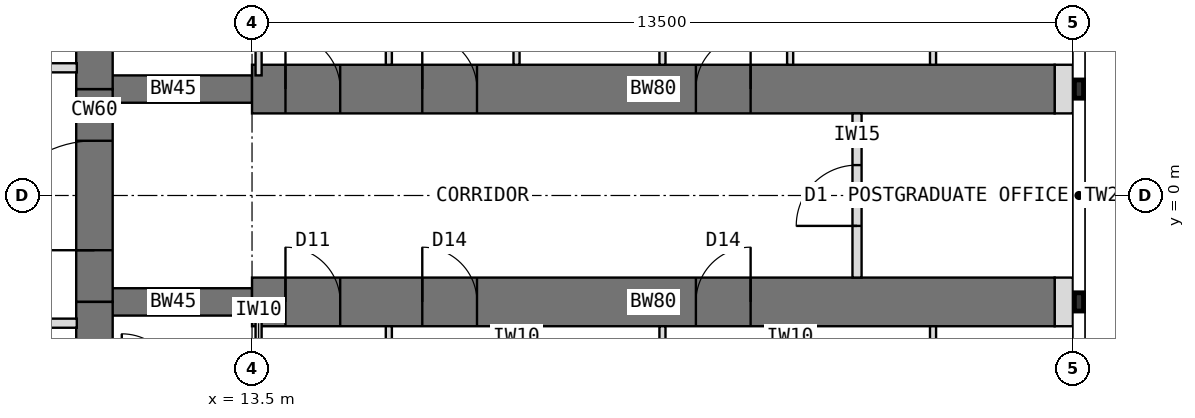
"""IFC4 building model, lengths in metres.
Left out: names, types, materials, properties, quantities, classifications, styles, units other than length and angle.
Written with IfcOpenShell. Run it as: python <this file> out.ifc"""

import sys

from ifc_helpers import new_model, si_unit, direction, frame, frame_2d, origin, place, context, subcontext, project, spatial, rectangle, extrude, element, fill, save


model = new_model("IFC4")
c1 = context("Model", 3, precision=1e-05, world=origin(), true_north=direction((0.0, 1.0)))
c2 = subcontext(c1, "Body", "Model", "MODEL_VIEW")
j1 = project(units=[si_unit("LENGTHUNIT", "METRE"), si_unit("PLANEANGLEUNIT", "RADIAN")], contexts=[c1])
p1 = place(None, origin())
s1 = spatial("IfcSite", under=j1, at=p1, CompositionType="ELEMENT")
p2 = place(p1, origin())
s2 = spatial("IfcBuilding", under=s1, at=p2, CompositionType="ELEMENT")
p3 = place(p2, frame((0.0, 0.0, 157.5)))
s3 = spatial("IfcBuildingStorey", under=s2, at=p3, CompositionType="ELEMENT", Elevation=157.5)
p4 = place(p3, frame((10.908, -6.298, 0.0), z_axis=(0.0, 0.0, 1.0), x_axis=(0.0, 1.0, 0.0)))
e1 = element("IfcWall", 1, at=p4, inside=s3, PredefinedType="SHEAR", context=c2, shape_type="SweptSolid", body=[
    extrude(rectangle(XDim=4.548, YDim=0.6, at=frame_2d((2.274, 0.0))), origin(), (0.0, 0.0, 1.0), 4.0),
])
p5 = place(p3, frame((10.908, -1.75, 0.0), z_axis=(0.0, 0.0, 1.0), x_axis=(0.0, 1.0, 0.0)))
e2 = element("IfcWall", 2, at=p5, inside=s3, PredefinedType="SHEAR", context=c2, shape_type="SweptSolid", body=[
    extrude(rectangle(XDim=3.5, YDim=0.6, at=frame_2d((1.75, 0.0))), origin(), (0.0, 0.0, 1.0), 4.0),
])
p6 = place(p5, frame((0.85, 0.0, 0.0)))
e3 = element("IfcOpeningElement", 3, at=p6, cuts=e2, PredefinedType="OPENING", context=c2, shape_type="SweptSolid", body=[
    extrude(rectangle(XDim=1.8, YDim=2.1, at=frame_2d((0.9, 1.05))), frame((0.0, 0.31, 0.0), z_axis=(0.0, -1.0, 0.0), x_axis=(1.0, 0.0, 0.0)), (0.0, 0.0, 1.0), 0.62),
])
p7 = place(p3, frame((10.908, 1.75, 0.0), z_axis=(0.0, 0.0, 1.0), x_axis=(0.0, 1.0, 0.0)))
e4 = element("IfcWall", 4, at=p7, inside=s3, PredefinedType="SHEAR", context=c2, shape_type="SweptSolid", body=[
    extrude(rectangle(XDim=4.548, YDim=0.6, at=frame_2d((2.274, 0.0))), origin(), (0.0, 0.0, 1.0), 4.0),
])
p8 = place(p3, frame((10.908, 1.75, 0.0), z_axis=(0.0, 0.0, 1.0), x_axis=(1.0, 0.0, 0.0)))
e5 = element("IfcWall", 5, at=p8, inside=s3, PredefinedType="SHEAR", context=c2, shape_type="SweptSolid", body=[
    extrude(rectangle(XDim=2.592, YDim=0.45, at=frame_2d((1.296, 0.0))), origin(), (0.0, 0.0, 1.0), 4.0),
])
p9 = place(p3, frame((13.5, 1.75, 0.0), z_axis=(0.0, 0.0, 1.0), x_axis=(1.0, 0.0, 0.0)))
e6 = element("IfcWall", 6, at=p9, inside=s3, PredefinedType="SHEAR", context=c2, shape_type="SweptSolid", body=[
    extrude(rectangle(XDim=13.2, YDim=0.8, at=frame_2d((6.6, 0.0))), origin(), (0.0, 0.0, 1.0), 4.0),
])
p10 = place(p9, frame((0.55, 0.0, 0.0)))
e7 = element("IfcOpeningElement", 7, at=p10, cuts=e6, PredefinedType="OPENING", context=c2, shape_type="SweptSolid", body=[
    extrude(rectangle(XDim=0.9, YDim=2.1, at=frame_2d((0.45, 1.05))), frame((0.0, 0.41, 0.0), z_axis=(0.0, -1.0, 0.0), x_axis=(1.0, 0.0, 0.0)), (0.0, 0.0, 1.0), 0.82),
])
p11 = place(p9, frame((2.8, 0.0, 0.0)))
e8 = element("IfcOpeningElement", 8, at=p11, cuts=e6, PredefinedType="OPENING", context=c2, shape_type="SweptSolid", body=[
    extrude(rectangle(XDim=0.9, YDim=2.1, at=frame_2d((0.45, 1.05))), frame((0.0, 0.41, 0.0), z_axis=(0.0, -1.0, 0.0), x_axis=(1.0, 0.0, 0.0)), (0.0, 0.0, 1.0), 0.82),
])
p12 = place(p9, frame((7.3, 0.0, 0.0)))
e9 = element("IfcOpeningElement", 9, at=p12, cuts=e6, PredefinedType="OPENING", context=c2, shape_type="SweptSolid", body=[
    extrude(rectangle(XDim=0.9, YDim=2.1, at=frame_2d((0.45, 1.05))), frame((0.0, 0.41, 0.0), z_axis=(0.0, -1.0, 0.0), x_axis=(1.0, 0.0, 0.0)), (0.0, 0.0, 1.0), 0.82),
])
p13 = place(p3, frame((10.908, -1.75, 0.0), z_axis=(0.0, 0.0, 1.0), x_axis=(1.0, 0.0, 0.0)))
e10 = element("IfcWall", 10, at=p13, inside=s3, PredefinedType="SHEAR", context=c2, shape_type="SweptSolid", body=[
    extrude(rectangle(XDim=2.592, YDim=0.45, at=frame_2d((1.296, 0.0))), origin(), (0.0, 0.0, 1.0), 4.0),
])
p14 = place(p3, frame((13.5, -1.75, 0.0), z_axis=(0.0, 0.0, 1.0), x_axis=(1.0, 0.0, 0.0)))
e11 = element("IfcWall", 11, at=p14, inside=s3, PredefinedType="SHEAR", context=c2, shape_type="SweptSolid", body=[
    extrude(rectangle(XDim=13.2, YDim=0.8, at=frame_2d((6.6, 0.0))), origin(), (0.0, 0.0, 1.0), 4.0),
])
p15 = place(p14, frame((0.55, 0.0, 0.0)))
e12 = element("IfcOpeningElement", 12, at=p15, cuts=e11, PredefinedType="OPENING", context=c2, shape_type="SweptSolid", body=[
    extrude(rectangle(XDim=0.9, YDim=2.1, at=frame_2d((0.45, 1.05))), frame((0.0, 0.41, 0.0), z_axis=(0.0, -1.0, 0.0), x_axis=(1.0, 0.0, 0.0)), (0.0, 0.0, 1.0), 0.82),
])
p16 = place(p14, frame((2.8, 0.0, 0.0)))
e13 = element("IfcOpeningElement", 13, at=p16, cuts=e11, PredefinedType="OPENING", context=c2, shape_type="SweptSolid", body=[
    extrude(rectangle(XDim=0.9, YDim=2.1, at=frame_2d((0.45, 1.05))), frame((0.0, 0.41, 0.0), z_axis=(0.0, -1.0, 0.0), x_axis=(1.0, 0.0, 0.0)), (0.0, 0.0, 1.0), 0.82),
])
p17 = place(p14, frame((7.3, 0.0, 0.0)))
e14 = element("IfcOpeningElement", 14, at=p17, cuts=e11, PredefinedType="OPENING", context=c2, shape_type="SweptSolid", body=[
    extrude(rectangle(XDim=0.9, YDim=2.1, at=frame_2d((0.45, 1.05))), frame((0.0, 0.41, 0.0), z_axis=(0.0, -1.0, 0.0), x_axis=(1.0, 0.0, 0.0)), (0.0, 0.0, 1.0), 0.82),
])
for number, where, z_axis, x_axis in (
    (15, (26.7, 1.75, 0.0), (0.0, 0.0, 1.0), (1.0, 0.0, 0.0)),
    (16, (26.7, -1.75, 0.0), (0.0, 0.0, 1.0), (1.0, 0.0, 0.0)),
):
    element("IfcWall", number, at=place(p3, frame(where, z_axis=z_axis, x_axis=x_axis)), inside=s3, PredefinedType="PARTITIONING", context=c2, shape_type="SweptSolid", body=[
        extrude(rectangle(XDim=0.3, YDim=0.8, at=frame_2d((0.15, 0.0))), origin(), (0.0, 0.0, 1.0), 3.8),
    ])
for number, where, z_axis, x_axis in (
    (17, (15.75, 2.15, 0.0), (0.0, 0.0, 1.0), (0.0, 1.0, 0.0)),
    (18, (20.25, 2.15, 0.0), (0.0, 0.0, 1.0), (0.0, 1.0, 0.0)),
):
    element("IfcWall", number, at=place(p3, frame(where, z_axis=z_axis, x_axis=x_axis)), inside=s3, PredefinedType="PARTITIONING", context=c2, shape_type="SweptSolid", body=[
        extrude(rectangle(XDim=4.6, YDim=0.1, at=frame_2d((2.3, 0.0))), origin(), (0.0, 0.0, 1.0), 3.8),
    ])
p18 = place(p3, frame((17.85, 2.15, 0.0), z_axis=(0.0, 0.0, 1.0), x_axis=(0.0, 1.0, 0.0)))
e19 = element("IfcWall", 19, at=p18, inside=s3, PredefinedType="PARTITIONING", context=c2, shape_type="SweptSolid", body=[
    extrude(rectangle(XDim=3.4, YDim=0.1, at=frame_2d((1.7, 0.0))), origin(), (0.0, 0.0, 1.0), 3.8),
])
p19 = place(p18, frame((1.25, 0.0, 0.0)))
e20 = element("IfcOpeningElement", 20, at=p19, cuts=e19, PredefinedType="OPENING", context=c2, shape_type="SweptSolid", body=[
    extrude(rectangle(XDim=0.9, YDim=2.1, at=frame_2d((0.45, 1.05))), frame((0.0, 0.06, 0.0), z_axis=(0.0, -1.0, 0.0), x_axis=(1.0, 0.0, 0.0)), (0.0, 0.0, 1.0), 0.12),
])
p20 = place(p3, frame((22.35, 2.15, 0.0), z_axis=(0.0, 0.0, 1.0), x_axis=(0.0, 1.0, 0.0)))
e21 = element("IfcWall", 21, at=p20, inside=s3, PredefinedType="PARTITIONING", context=c2, shape_type="SweptSolid", body=[
    extrude(rectangle(XDim=3.4, YDim=0.1, at=frame_2d((1.7, 0.0))), origin(), (0.0, 0.0, 1.0), 3.8),
])
p21 = place(p20, frame((1.25, 0.0, 0.0)))
e22 = element("IfcOpeningElement", 22, at=p21, cuts=e21, PredefinedType="OPENING", context=c2, shape_type="SweptSolid", body=[
    extrude(rectangle(XDim=0.9, YDim=2.1, at=frame_2d((0.45, 1.05))), frame((0.0, 0.06, 0.0), z_axis=(0.0, -1.0, 0.0), x_axis=(1.0, 0.0, 0.0)), (0.0, 0.0, 1.0), 0.12),
])
p22 = place(p3, frame((24.7, 2.15, 0.0), z_axis=(0.0, 0.0, 1.0), x_axis=(0.0, 1.0, 0.0)))
e23 = element("IfcWall", 23, at=p22, inside=s3, PredefinedType="PARTITIONING", context=c2, shape_type="SweptSolid", body=[
    extrude(rectangle(XDim=3.4, YDim=0.1, at=frame_2d((1.7, 0.0))), origin(), (0.0, 0.0, 1.0), 3.8),
])
p23 = place(p3, frame((13.608, 1.975, 0.0), z_axis=(0.0, 0.0, 1.0), x_axis=(0.0, 1.0, 0.0)))
e24 = element("IfcWall", 24, at=p23, inside=s3, PredefinedType="PARTITIONING", context=c2, shape_type="SweptSolid", body=[
    extrude(rectangle(XDim=3.2, YDim=0.1, at=frame_2d((1.6, 0.0))), origin(), (0.0, 0.0, 1.0), 3.8),
])
for number, where, z_axis, x_axis in (
    (25, (15.75, -2.15, 0.0), (0.0, 0.0, 1.0), (0.0, -1.0, 0.0)),
    (26, (20.25, -2.15, 0.0), (0.0, 0.0, 1.0), (0.0, -1.0, 0.0)),
):
    element("IfcWall", number, at=place(p3, frame(where, z_axis=z_axis, x_axis=x_axis)), inside=s3, PredefinedType="PARTITIONING", context=c2, shape_type="SweptSolid", body=[
        extrude(rectangle(XDim=4.6, YDim=0.1, at=frame_2d((2.3, 0.0))), origin(), (0.0, 0.0, 1.0), 3.8),
    ])
p24 = place(p3, frame((17.85, -2.15, 0.0), z_axis=(0.0, 0.0, 1.0), x_axis=(0.0, -1.0, 0.0)))
e27 = element("IfcWall", 27, at=p24, inside=s3, PredefinedType="PARTITIONING", context=c2, shape_type="SweptSolid", body=[
    extrude(rectangle(XDim=3.4, YDim=0.1, at=frame_2d((1.7, 0.0))), origin(), (0.0, 0.0, 1.0), 3.8),
])
p25 = place(p24, frame((1.25, 0.0, 0.0)))
e28 = element("IfcOpeningElement", 28, at=p25, cuts=e27, PredefinedType="OPENING", context=c2, shape_type="SweptSolid", body=[
    extrude(rectangle(XDim=0.9, YDim=2.1, at=frame_2d((0.45, 1.05))), frame((0.0, 0.06, 0.0), z_axis=(0.0, -1.0, 0.0), x_axis=(1.0, 0.0, 0.0)), (0.0, 0.0, 1.0), 0.12),
])
p26 = place(p3, frame((22.35, -2.15, 0.0), z_axis=(0.0, 0.0, 1.0), x_axis=(0.0, -1.0, 0.0)))
e29 = element("IfcWall", 29, at=p26, inside=s3, PredefinedType="PARTITIONING", context=c2, shape_type="SweptSolid", body=[
    extrude(rectangle(XDim=3.4, YDim=0.1, at=frame_2d((1.7, 0.0))), origin(), (0.0, 0.0, 1.0), 3.8),
])
p27 = place(p26, frame((1.25, 0.0, 0.0)))
e30 = element("IfcOpeningElement", 30, at=p27, cuts=e29, PredefinedType="OPENING", context=c2, shape_type="SweptSolid", body=[
    extrude(rectangle(XDim=0.9, YDim=2.1, at=frame_2d((0.45, 1.05))), frame((0.0, 0.06, 0.0), z_axis=(0.0, -1.0, 0.0), x_axis=(1.0, 0.0, 0.0)), (0.0, 0.0, 1.0), 0.12),
])
p28 = place(p3, frame((24.7, -2.15, 0.0), z_axis=(0.0, 0.0, 1.0), x_axis=(0.0, -1.0, 0.0)))
e31 = element("IfcWall", 31, at=p28, inside=s3, PredefinedType="PARTITIONING", context=c2, shape_type="SweptSolid", body=[
    extrude(rectangle(XDim=3.4, YDim=0.1, at=frame_2d((1.7, 0.0))), origin(), (0.0, 0.0, 1.0), 3.8),
])
p29 = place(p3, frame((13.608, -1.975, 0.0), z_axis=(0.0, 0.0, 1.0), x_axis=(0.0, -1.0, 0.0)))
e32 = element("IfcWall", 32, at=p29, inside=s3, PredefinedType="PARTITIONING", context=c2, shape_type="SweptSolid", body=[
    extrude(rectangle(XDim=1.2, YDim=0.1, at=frame_2d((0.6, 0.0))), origin(), (0.0, 0.0, 1.0), 3.8),
])
p30 = place(p3, frame((6.143, 2.1, 0.0), z_axis=(0.0, 0.0, 1.0), x_axis=(1.0, 0.0, 0.0)))
e33 = element("IfcWall", 33, at=p30, inside=s3, PredefinedType="PARTITIONING", context=c2, shape_type="SweptSolid", body=[
    extrude(rectangle(XDim=4.476, YDim=0.15, at=frame_2d((2.238, 0.0))), origin(), (0.0, 0.0, 1.0), 3.8),
])
p31 = place(p30, frame((2.633, 0.0, 0.0)))
e34 = element("IfcOpeningElement", 34, at=p31, cuts=e33, PredefinedType="OPENING", context=c2, shape_type="SweptSolid", body=[
    extrude(rectangle(XDim=1.0, YDim=2.1, at=frame_2d((0.5, 1.05))), frame((0.0, 0.085, 0.0), z_axis=(0.0, -1.0, 0.0), x_axis=(1.0, 0.0, 0.0)), (0.0, 0.0, 1.0), 0.17),
])
p32 = place(p3, frame((10.618, -2.1, 0.0), z_axis=(0.0, 0.0, 1.0), x_axis=(-1.0, 0.0, 0.0)))
e35 = element("IfcWall", 35, at=p32, inside=s3, PredefinedType="PARTITIONING", context=c2, shape_type="SweptSolid", body=[
    extrude(rectangle(XDim=4.476, YDim=0.15, at=frame_2d((2.238, 0.0))), origin(), (0.0, 0.0, 1.0), 3.8),
])
p33 = place(p32, frame((0.843, 0.0, 0.0)))
e36 = element("IfcOpeningElement", 36, at=p33, cuts=e35, PredefinedType="OPENING", context=c2, shape_type="SweptSolid", body=[
    extrude(rectangle(XDim=1.0, YDim=2.1, at=frame_2d((0.5, 1.05))), frame((0.0, 0.085, 0.0), z_axis=(0.0, -1.0, 0.0), x_axis=(1.0, 0.0, 0.0)), (0.0, 0.0, 1.0), 0.17),
])
p34 = place(p3, frame((23.45, -1.35, 0.0), z_axis=(0.0, 0.0, 1.0), x_axis=(0.0, 1.0, 0.0)))
e37 = element("IfcWall", 37, at=p34, inside=s3, PredefinedType="PARTITIONING", context=c2, shape_type="SweptSolid", body=[
    extrude(rectangle(XDim=2.7, YDim=0.15, at=frame_2d((1.35, 0.0))), origin(), (0.0, 0.0, 1.0), 3.8),
])
p35 = place(p34, frame((0.85, 0.0, 0.0)))
e38 = element("IfcOpeningElement", 38, at=p35, cuts=e37, PredefinedType="OPENING", context=c2, shape_type="SweptSolid", body=[
    extrude(rectangle(XDim=1.0, YDim=2.1, at=frame_2d((0.5, 1.05))), frame((0.0, 0.085, 0.0), z_axis=(0.0, -1.0, 0.0), x_axis=(1.0, 0.0, 0.0)), (0.0, 0.0, 1.0), 0.17),
])
p36 = place(p6, origin())
e39 = element("IfcDoor", 39, at=p36, inside=s3, OperationType="DOUBLE_DOOR_DOUBLE_SWING", PredefinedType="DOOR", context=c2, shape_type="SweptSolid", body=[
    extrude(rectangle(XDim=1.72, YDim=2.06, at=frame_2d((0.9, 1.03))), frame((0.0, 0.025, 0.0), z_axis=(0.0, -1.0, 0.0), x_axis=(1.0, 0.0, 0.0)), (0.0, 0.0, 1.0), 0.05),
    extrude(rectangle(XDim=0.04, YDim=2.1, at=frame_2d((0.02, 1.05))), frame((0.0, 0.3, 0.0), z_axis=(0.0, -1.0, 0.0), x_axis=(1.0, 0.0, 0.0)), (0.0, 0.0, 1.0), 0.6),
    extrude(rectangle(XDim=0.04, YDim=2.1, at=frame_2d((1.78, 1.05))), frame((0.0, 0.3, 0.0), z_axis=(0.0, -1.0, 0.0), x_axis=(1.0, 0.0, 0.0)), (0.0, 0.0, 1.0), 0.6),
    extrude(rectangle(XDim=1.72, YDim=0.04, at=frame_2d((0.9, 2.08))), frame((0.0, 0.3, 0.0), z_axis=(0.0, -1.0, 0.0), x_axis=(1.0, 0.0, 0.0)), (0.0, 0.0, 1.0), 0.6),
])
fill(e3, e39)
p37 = place(p35, origin())
e40 = element("IfcDoor", 40, at=p37, inside=s3, OperationType="SINGLE_SWING_LEFT", PredefinedType="DOOR", context=c2, shape_type="SweptSolid", body=[
    extrude(rectangle(XDim=1.0, YDim=2.1, at=frame_2d((0.5, 1.05))), frame((0.0, 0.025, 0.0), z_axis=(0.0, -1.0, 0.0), x_axis=(1.0, 0.0, 0.0)), (0.0, 0.0, 1.0), 0.05),
])
fill(e38, e40)
p38 = place(p10, origin())
e41 = element("IfcDoor", 41, at=p38, inside=s3, OperationType="SINGLE_SWING_LEFT", PredefinedType="DOOR", context=c2, shape_type="SweptSolid", body=[
    extrude(rectangle(XDim=0.82, YDim=2.06, at=frame_2d((0.45, 1.03))), frame((0.0, 0.025, 0.0), z_axis=(0.0, -1.0, 0.0), x_axis=(1.0, 0.0, 0.0)), (0.0, 0.0, 1.0), 0.05),
    extrude(rectangle(XDim=0.04, YDim=2.1, at=frame_2d((0.02, 1.05))), frame((0.0, 0.4, 0.0), z_axis=(0.0, -1.0, 0.0), x_axis=(1.0, 0.0, 0.0)), (0.0, 0.0, 1.0), 0.8),
    extrude(rectangle(XDim=0.04, YDim=2.1, at=frame_2d((0.88, 1.05))), frame((0.0, 0.4, 0.0), z_axis=(0.0, -1.0, 0.0), x_axis=(1.0, 0.0, 0.0)), (0.0, 0.0, 1.0), 0.8),
    extrude(rectangle(XDim=0.82, YDim=0.04, at=frame_2d((0.45, 2.08))), frame((0.0, 0.4, 0.0), z_axis=(0.0, -1.0, 0.0), x_axis=(1.0, 0.0, 0.0)), (0.0, 0.0, 1.0), 0.8),
])
fill(e7, e41)
p39 = place(p11, origin())
e42 = element("IfcDoor", 42, at=p39, inside=s3, OperationType="SINGLE_SWING_LEFT", PredefinedType="DOOR", context=c2, shape_type="SweptSolid", body=[
    extrude(rectangle(XDim=0.82, YDim=2.06, at=frame_2d((0.45, 1.03))), frame((0.0, 0.025, 0.0), z_axis=(0.0, -1.0, 0.0), x_axis=(1.0, 0.0, 0.0)), (0.0, 0.0, 1.0), 0.05),
    extrude(rectangle(XDim=0.04, YDim=2.1, at=frame_2d((0.02, 1.05))), frame((0.0, 0.4, 0.0), z_axis=(0.0, -1.0, 0.0), x_axis=(1.0, 0.0, 0.0)), (0.0, 0.0, 1.0), 0.8),
    extrude(rectangle(XDim=0.04, YDim=2.1, at=frame_2d((0.88, 1.05))), frame((0.0, 0.4, 0.0), z_axis=(0.0, -1.0, 0.0), x_axis=(1.0, 0.0, 0.0)), (0.0, 0.0, 1.0), 0.8),
    extrude(rectangle(XDim=0.82, YDim=0.04, at=frame_2d((0.45, 2.08))), frame((0.0, 0.4, 0.0), z_axis=(0.0, -1.0, 0.0), x_axis=(1.0, 0.0, 0.0)), (0.0, 0.0, 1.0), 0.8),
])
fill(e8, e42)
p40 = place(p12, origin())
e43 = element("IfcDoor", 43, at=p40, inside=s3, OperationType="SINGLE_SWING_RIGHT", PredefinedType="DOOR", context=c2, shape_type="SweptSolid", body=[
    extrude(rectangle(XDim=0.82, YDim=2.06, at=frame_2d((0.45, 1.03))), frame((0.0, 0.025, 0.0), z_axis=(0.0, -1.0, 0.0), x_axis=(1.0, 0.0, 0.0)), (0.0, 0.0, 1.0), 0.05),
    extrude(rectangle(XDim=0.04, YDim=2.1, at=frame_2d((0.02, 1.05))), frame((0.0, 0.4, 0.0), z_axis=(0.0, -1.0, 0.0), x_axis=(1.0, 0.0, 0.0)), (0.0, 0.0, 1.0), 0.8),
    extrude(rectangle(XDim=0.04, YDim=2.1, at=frame_2d((0.88, 1.05))), frame((0.0, 0.4, 0.0), z_axis=(0.0, -1.0, 0.0), x_axis=(1.0, 0.0, 0.0)), (0.0, 0.0, 1.0), 0.8),
    extrude(rectangle(XDim=0.82, YDim=0.04, at=frame_2d((0.45, 2.08))), frame((0.0, 0.4, 0.0), z_axis=(0.0, -1.0, 0.0), x_axis=(1.0, 0.0, 0.0)), (0.0, 0.0, 1.0), 0.8),
])
fill(e9, e43)
p41 = place(p15, origin())
e44 = element("IfcDoor", 44, at=p41, inside=s3, OperationType="SINGLE_SWING_LEFT", PredefinedType="DOOR", context=c2, shape_type="SweptSolid", body=[
    extrude(rectangle(XDim=0.82, YDim=2.06, at=frame_2d((0.45, 1.03))), frame((0.0, 0.025, 0.0), z_axis=(0.0, -1.0, 0.0), x_axis=(1.0, 0.0, 0.0)), (0.0, 0.0, 1.0), 0.05),
    extrude(rectangle(XDim=0.04, YDim=2.1, at=frame_2d((0.02, 1.05))), frame((0.0, 0.4, 0.0), z_axis=(0.0, -1.0, 0.0), x_axis=(1.0, 0.0, 0.0)), (0.0, 0.0, 1.0), 0.8),
    extrude(rectangle(XDim=0.04, YDim=2.1, at=frame_2d((0.88, 1.05))), frame((0.0, 0.4, 0.0), z_axis=(0.0, -1.0, 0.0), x_axis=(1.0, 0.0, 0.0)), (0.0, 0.0, 1.0), 0.8),
    extrude(rectangle(XDim=0.82, YDim=0.04, at=frame_2d((0.45, 2.08))), frame((0.0, 0.4, 0.0), z_axis=(0.0, -1.0, 0.0), x_axis=(1.0, 0.0, 0.0)), (0.0, 0.0, 1.0), 0.8),
])
fill(e12, e44)
p42 = place(p16, origin())
e45 = element("IfcDoor", 45, at=p42, inside=s3, OperationType="SINGLE_SWING_LEFT", PredefinedType="DOOR", context=c2, shape_type="SweptSolid", body=[
    extrude(rectangle(XDim=0.82, YDim=2.06, at=frame_2d((0.45, 1.03))), frame((0.0, 0.025, 0.0), z_axis=(0.0, -1.0, 0.0), x_axis=(1.0, 0.0, 0.0)), (0.0, 0.0, 1.0), 0.05),
    extrude(rectangle(XDim=0.04, YDim=2.1, at=frame_2d((0.02, 1.05))), frame((0.0, 0.4, 0.0), z_axis=(0.0, -1.0, 0.0), x_axis=(1.0, 0.0, 0.0)), (0.0, 0.0, 1.0), 0.8),
    extrude(rectangle(XDim=0.04, YDim=2.1, at=frame_2d((0.88, 1.05))), frame((0.0, 0.4, 0.0), z_axis=(0.0, -1.0, 0.0), x_axis=(1.0, 0.0, 0.0)), (0.0, 0.0, 1.0), 0.8),
    extrude(rectangle(XDim=0.82, YDim=0.04, at=frame_2d((0.45, 2.08))), frame((0.0, 0.4, 0.0), z_axis=(0.0, -1.0, 0.0), x_axis=(1.0, 0.0, 0.0)), (0.0, 0.0, 1.0), 0.8),
])
fill(e13, e45)
p43 = place(p17, origin())
e46 = element("IfcDoor", 46, at=p43, inside=s3, OperationType="SINGLE_SWING_RIGHT", PredefinedType="DOOR", context=c2, shape_type="SweptSolid", body=[
    extrude(rectangle(XDim=0.82, YDim=2.06, at=frame_2d((0.45, 1.03))), frame((0.0, 0.025, 0.0), z_axis=(0.0, -1.0, 0.0), x_axis=(1.0, 0.0, 0.0)), (0.0, 0.0, 1.0), 0.05),
    extrude(rectangle(XDim=0.04, YDim=2.1, at=frame_2d((0.02, 1.05))), frame((0.0, 0.4, 0.0), z_axis=(0.0, -1.0, 0.0), x_axis=(1.0, 0.0, 0.0)), (0.0, 0.0, 1.0), 0.8),
    extrude(rectangle(XDim=0.04, YDim=2.1, at=frame_2d((0.88, 1.05))), frame((0.0, 0.4, 0.0), z_axis=(0.0, -1.0, 0.0), x_axis=(1.0, 0.0, 0.0)), (0.0, 0.0, 1.0), 0.8),
    extrude(rectangle(XDim=0.82, YDim=0.04, at=frame_2d((0.45, 2.08))), frame((0.0, 0.4, 0.0), z_axis=(0.0, -1.0, 0.0), x_axis=(1.0, 0.0, 0.0)), (0.0, 0.0, 1.0), 0.8),
])
fill(e14, e46)
save(model, sys.argv[1])
